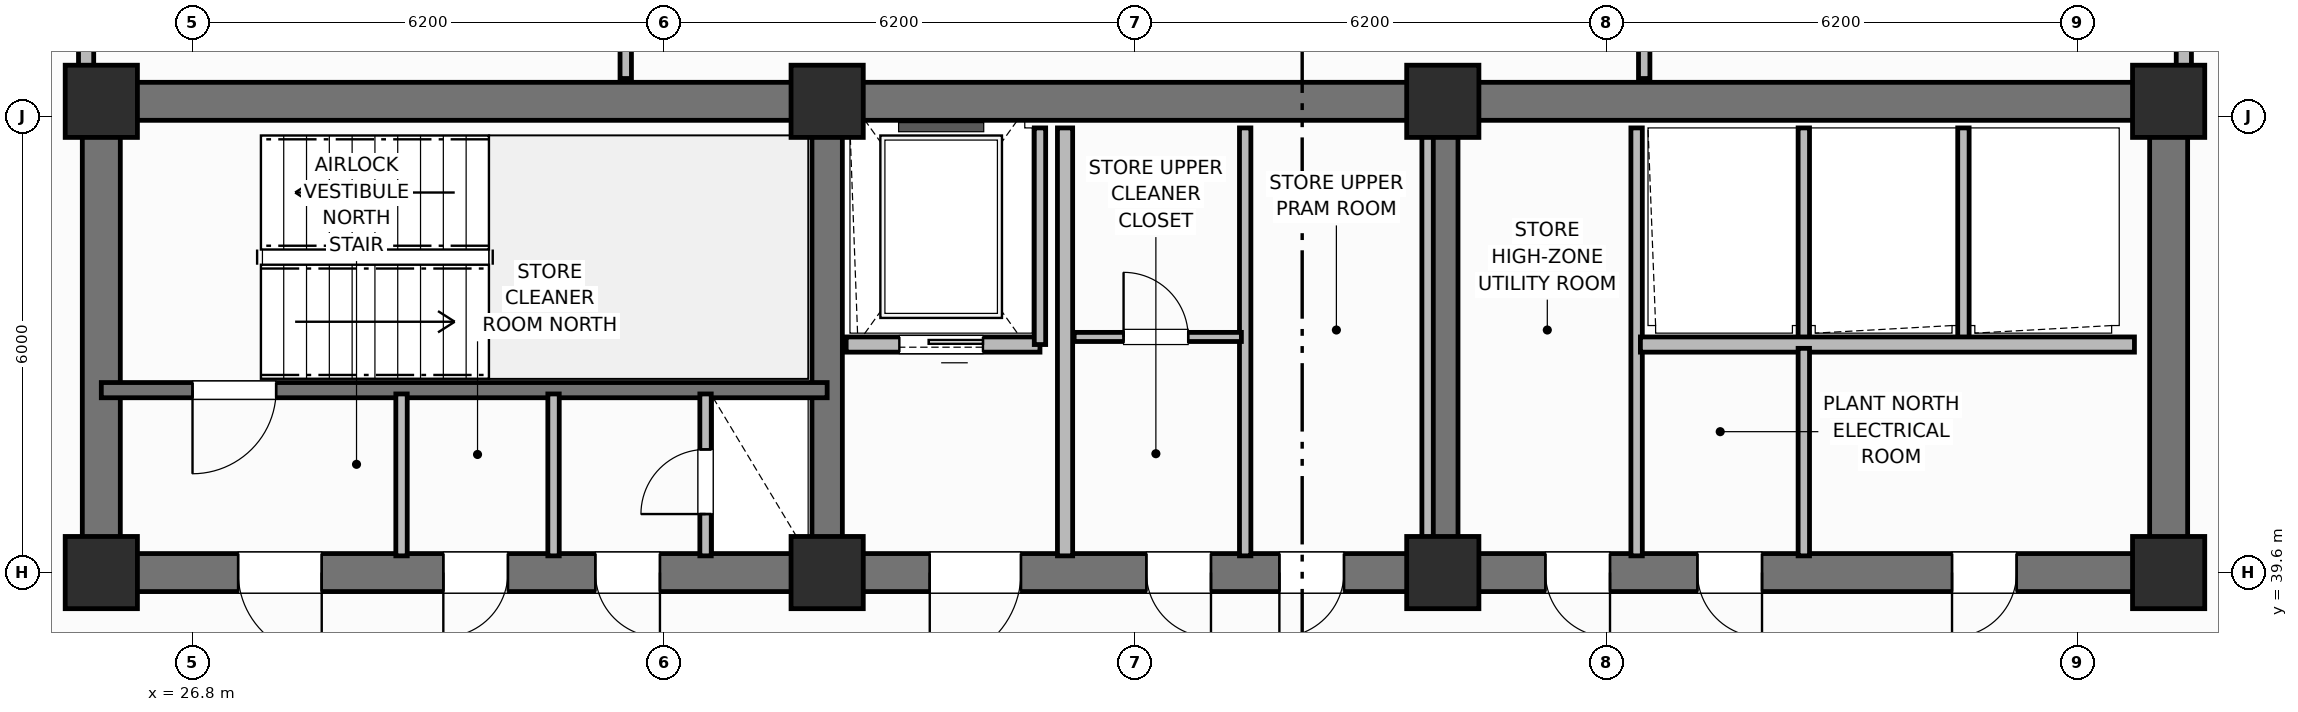
"""IFC4 building model, lengths in metres.
Left out: names, types, materials, properties, quantities, classifications, styles, units other than length and angle.
Written with IfcOpenShell. Run it as: python <this file> out.ifc"""

import sys

from ifc_helpers import new_model, si_unit, direction, frame, frame_2d, origin, origin_2d, place, context, subcontext, project, spatial, rectangle, extrude, element, fill, save


model = new_model("IFC4")
c1 = context("Model", 3, precision=1e-05, world=origin(), true_north=direction((0.0, 1.0)))
c2 = subcontext(c1, "Body", "Model", "MODEL_VIEW")
j1 = project(units=[si_unit("LENGTHUNIT", "METRE"), si_unit("PLANEANGLEUNIT", "RADIAN")], contexts=[c1])
p1 = place(None, origin())
s1 = spatial("IfcSite", under=j1, at=p1, CompositionType="ELEMENT")
p2 = place(p1, origin())
s2 = spatial("IfcBuilding", under=s1, at=p2, CompositionType="ELEMENT")
p3 = place(p2, frame((0.0, 0.0, 192.2)))
s3 = spatial("IfcBuildingStorey", under=s2, at=p3, CompositionType="ELEMENT", Elevation=192.2)
p4 = place(p3, frame((25.6, 45.8, 0.0), z_axis=(0.0, 0.0, 1.0), x_axis=(1.0, 0.0, 0.0)))
e1 = element("IfcWall", 1, at=p4, inside=s3, PredefinedType="SHEAR", context=c2, shape_type="SweptSolid", body=[
    extrude(rectangle(XDim=27.2, YDim=0.5, at=frame_2d((13.6, 0.0))), origin(), (0.0, 0.0, 1.0), 3.7),
])
for number, where, z_axis, x_axis in (
    (2, (25.6, 39.85, 0.0), (0.0, 0.0, 1.0), (0.0, 1.0, 0.0)),
    (3, (52.8, 39.85, 0.0), (0.0, 0.0, 1.0), (0.0, 1.0, 0.0)),
):
    element("IfcWall", number, at=place(p3, frame(where, z_axis=z_axis, x_axis=x_axis)), inside=s3, PredefinedType="SHEAR", context=c2, shape_type="SweptSolid", body=[
        extrude(rectangle(XDim=5.7, YDim=0.5, at=frame_2d((2.85, 0.0))), origin(), (0.0, 0.0, 1.0), 3.7),
    ])
p5 = place(p3, frame((52.8, 39.6, 0.0), z_axis=(0.0, 0.0, 1.0), x_axis=(-1.0, 0.0, 0.0)))
e4 = element("IfcWall", 4, at=p5, inside=s3, PredefinedType="SHEAR", context=c2, shape_type="SweptSolid", body=[
    extrude(rectangle(XDim=27.2, YDim=0.5, at=frame_2d((13.6, 0.0))), origin(), (0.0, 0.0, 1.0), 3.7),
])
p6 = place(p5, frame((24.3, 0.0, 0.0)))
e5 = element("IfcOpeningElement", 5, at=p6, cuts=e4, PredefinedType="OPENING", context=c2, shape_type="SweptSolid", body=[
    extrude(rectangle(XDim=1.1, YDim=2.15, at=frame_2d((0.55, 1.075))), frame((0.0, 0.26, 0.0), z_axis=(0.0, -1.0, 0.0), x_axis=(1.0, 0.0, 0.0)), (0.0, 0.0, 1.0), 0.52),
])
p7 = place(p5, frame((21.85, 0.0, 0.0)))
e6 = element("IfcOpeningElement", 6, at=p7, cuts=e4, PredefinedType="OPENING", context=c2, shape_type="SweptSolid", body=[
    extrude(rectangle(XDim=0.85, YDim=2.1, at=frame_2d((0.425, 1.05))), frame((0.0, 0.26, 0.0), z_axis=(0.0, -1.0, 0.0), x_axis=(1.0, 0.0, 0.0)), (0.0, 0.0, 1.0), 0.52),
])
p8 = place(p5, frame((19.85, 0.0, 0.0)))
e7 = element("IfcOpeningElement", 7, at=p8, cuts=e4, PredefinedType="OPENING", context=c2, shape_type="SweptSolid", body=[
    extrude(rectangle(XDim=0.85, YDim=2.1, at=frame_2d((0.425, 1.05))), frame((0.0, 0.26, 0.0), z_axis=(0.0, -1.0, 0.0), x_axis=(1.0, 0.0, 0.0)), (0.0, 0.0, 1.0), 0.52),
])
p9 = place(p5, frame((15.1, 0.0, 0.0)))
e8 = element("IfcOpeningElement", 8, at=p9, cuts=e4, PredefinedType="OPENING", context=c2, shape_type="SweptSolid", body=[
    extrude(rectangle(XDim=1.2, YDim=2.15, at=frame_2d((0.6, 1.075))), frame((0.0, 0.26, 0.0), z_axis=(0.0, -1.0, 0.0), x_axis=(1.0, 0.0, 0.0)), (0.0, 0.0, 1.0), 0.52),
])
p10 = place(p5, frame((12.6, 0.0, 0.0)))
e9 = element("IfcOpeningElement", 9, at=p10, cuts=e4, PredefinedType="OPENING", context=c2, shape_type="SweptSolid", body=[
    extrude(rectangle(XDim=0.85, YDim=2.1, at=frame_2d((0.425, 1.05))), frame((0.0, 0.26, 0.0), z_axis=(0.0, -1.0, 0.0), x_axis=(1.0, 0.0, 0.0)), (0.0, 0.0, 1.0), 0.52),
])
p11 = place(p5, frame((10.85, 0.0, 0.0)))
e10 = element("IfcOpeningElement", 10, at=p11, cuts=e4, PredefinedType="OPENING", context=c2, shape_type="SweptSolid", body=[
    extrude(rectangle(XDim=0.85, YDim=2.1, at=frame_2d((0.425, 1.05))), frame((0.0, 0.26, 0.0), z_axis=(0.0, -1.0, 0.0), x_axis=(1.0, 0.0, 0.0)), (0.0, 0.0, 1.0), 0.52),
])
p12 = place(p5, frame((7.35, 0.0, 0.0)))
e11 = element("IfcOpeningElement", 11, at=p12, cuts=e4, PredefinedType="OPENING", context=c2, shape_type="SweptSolid", body=[
    extrude(rectangle(XDim=0.85, YDim=2.1, at=frame_2d((0.425, 1.05))), frame((0.0, 0.26, 0.0), z_axis=(0.0, -1.0, 0.0), x_axis=(1.0, 0.0, 0.0)), (0.0, 0.0, 1.0), 0.52),
])
p13 = place(p5, frame((5.35, 0.0, 0.0)))
e12 = element("IfcOpeningElement", 12, at=p13, cuts=e4, PredefinedType="OPENING", context=c2, shape_type="SweptSolid", body=[
    extrude(rectangle(XDim=0.85, YDim=2.1, at=frame_2d((0.425, 1.05))), frame((0.0, 0.26, 0.0), z_axis=(0.0, -1.0, 0.0), x_axis=(1.0, 0.0, 0.0)), (0.0, 0.0, 1.0), 0.52),
])
p14 = place(p5, frame((2.0, 0.0, 0.0)))
e13 = element("IfcOpeningElement", 13, at=p14, cuts=e4, PredefinedType="OPENING", context=c2, shape_type="SweptSolid", body=[
    extrude(rectangle(XDim=0.85, YDim=2.1, at=frame_2d((0.425, 1.05))), frame((0.0, 0.26, 0.0), z_axis=(0.0, -1.0, 0.0), x_axis=(1.0, 0.0, 0.0)), (0.0, 0.0, 1.0), 0.52),
])
for number, where, z_axis, x_axis in (
    (14, (35.15, 39.85, 0.0), (0.0, 0.0, 1.0), (0.0, 1.0, 0.0)),
    (15, (43.25, 39.85, 0.0), (0.0, 0.0, 1.0), (0.0, 1.0, 0.0)),
):
    element("IfcWall", number, at=place(p3, frame(where, z_axis=z_axis, x_axis=x_axis)), inside=s3, PredefinedType="SHEAR", context=c2, shape_type="SweptSolid", body=[
        extrude(rectangle(XDim=5.7, YDim=0.4, at=frame_2d((2.85, 0.0))), origin(), (0.0, 0.0, 1.0), 3.7),
    ])
for number, where, z_axis, x_axis in (
    (16, (25.6, 39.6, 0.0), (0.0, 0.0, 1.0), (1.0, 0.0, 0.0)),
    (17, (25.6, 45.8, 0.0), (0.0, 0.0, 1.0), (1.0, 0.0, 0.0)),
    (18, (35.15, 39.6, 0.0), (0.0, 0.0, 1.0), (1.0, 0.0, 0.0)),
    (19, (35.15, 45.8, 0.0), (0.0, 0.0, 1.0), (1.0, 0.0, 0.0)),
    (20, (43.25, 39.6, 0.0), (0.0, 0.0, 1.0), (1.0, 0.0, 0.0)),
    (21, (43.25, 45.8, 0.0), (0.0, 0.0, 1.0), (1.0, 0.0, 0.0)),
    (22, (52.8, 39.6, 0.0), (0.0, 0.0, 1.0), (1.0, 0.0, 0.0)),
    (23, (52.8, 45.8, 0.0), (0.0, 0.0, 1.0), (1.0, 0.0, 0.0)),
):
    element("IfcColumn", number, at=place(p3, frame(where, z_axis=z_axis, x_axis=x_axis)), inside=s3, PredefinedType="COLUMN", context=c2, shape_type="SweptSolid", body=[
        extrude(rectangle(XDim=0.95, YDim=0.95, at=origin_2d()), origin(), (0.0, 0.0, 1.0), 3.7),
    ])
p15 = place(p3, frame((35.15, 42.0, 0.0), z_axis=(0.0, 0.0, 1.0), x_axis=(-1.0, 0.0, 0.0)))
e24 = element("IfcWall", 24, at=p15, inside=s3, PredefinedType="SHEAR", context=c2, shape_type="SweptSolid", body=[
    extrude(rectangle(XDim=9.55, YDim=0.2, at=frame_2d((4.775, 0.0))), origin(), (0.0, 0.0, 1.0), 3.7),
])
p16 = place(p15, frame((7.25, 0.0, 0.0)))
e25 = element("IfcOpeningElement", 25, at=p16, cuts=e24, PredefinedType="OPENING", context=c2, shape_type="SweptSolid", body=[
    extrude(rectangle(XDim=1.1, YDim=2.15, at=frame_2d((0.55, 1.075))), frame((0.0, 0.11, 0.0), z_axis=(0.0, -1.0, 0.0), x_axis=(1.0, 0.0, 0.0)), (0.0, 0.0, 1.0), 0.22),
])
p17 = place(p3, frame((33.55, 39.82, 0.0), z_axis=(0.0, 0.0, 1.0), x_axis=(0.0, 1.0, 0.0)))
e26 = element("IfcWall", 26, at=p17, inside=s3, PredefinedType="PARTITIONING", context=c2, shape_type="SweptSolid", body=[
    extrude(rectangle(XDim=2.13, YDim=0.15, at=frame_2d((1.065, 0.0))), origin(), (0.0, 0.0, 1.0), 2.49),
])
p18 = place(p17, frame((0.55, 0.0, 0.0)))
e27 = element("IfcOpeningElement", 27, at=p18, cuts=e26, PredefinedType="OPENING", context=c2, shape_type="SweptSolid", body=[
    extrude(rectangle(XDim=0.85, YDim=2.05, at=frame_2d((0.425, 1.025))), frame((0.0, 0.085, 0.0), z_axis=(0.0, -1.0, 0.0), x_axis=(1.0, 0.0, 0.0)), (0.0, 0.0, 1.0), 0.17),
])
for number, where, z_axis, x_axis in (
    (28, (29.55, 39.82, 0.0), (0.0, 0.0, 1.0), (0.0, 1.0, 0.0)),
    (29, (31.55, 39.82, 0.0), (0.0, 0.0, 1.0), (0.0, 1.0, 0.0)),
):
    element("IfcWall", number, at=place(p3, frame(where, z_axis=z_axis, x_axis=x_axis)), inside=s3, PredefinedType="PARTITIONING", context=c2, shape_type="SweptSolid", body=[
        extrude(rectangle(XDim=2.13, YDim=0.15, at=frame_2d((1.065, 0.0))), origin(), (0.0, 0.0, 1.0), 2.49),
    ])
p19 = place(p3, frame((37.95, 42.6, 0.0), z_axis=(0.0, 0.0, 1.0), x_axis=(-1.0, 0.0, 0.0)))
e30 = element("IfcWall", 30, at=p19, inside=s3, PredefinedType="PARTITIONING", context=c2, shape_type="SweptSolid", body=[
    extrude(rectangle(XDim=2.55, YDim=0.2, at=frame_2d((1.275, 0.0))), origin(), (0.0, 0.0, 1.0), 2.26),
])
p20 = place(p19, frame((0.75, 0.0, 0.0)))
e31 = element("IfcOpeningElement", 31, at=p20, cuts=e30, PredefinedType="OPENING", context=c2, shape_type="SweptSolid", body=[
    extrude(rectangle(XDim=1.1, YDim=2.15, at=frame_2d((0.55, 1.075))), frame((0.0, 0.11, 0.0), z_axis=(0.0, -1.0, 0.0), x_axis=(1.0, 0.0, 0.0)), (0.0, 0.0, 1.0), 0.22),
])
p21 = place(p3, frame((37.95, 42.6, 0.0), z_axis=(0.0, 0.0, 1.0), x_axis=(0.0, 1.0, 0.0)))
e32 = element("IfcWall", 32, at=p21, inside=s3, PredefinedType="PARTITIONING", context=c2, shape_type="SweptSolid", body=[
    extrude(rectangle(XDim=2.85, YDim=0.15, at=frame_2d((1.425, 0.0))), origin(), (0.0, 0.0, 1.0), 2.49),
])
p22 = place(p3, frame((38.28, 39.82, 0.0), z_axis=(0.0, 0.0, 1.0), x_axis=(0.0, 1.0, 0.0)))
e33 = element("IfcWall", 33, at=p22, inside=s3, PredefinedType="PARTITIONING", context=c2, shape_type="SweptSolid", body=[
    extrude(rectangle(XDim=5.63, YDim=0.2, at=frame_2d((2.815, 0.0))), origin(), (0.0, 0.0, 1.0), 2.49),
])
for number, where, z_axis, x_axis in (
    (34, (43.05, 39.82, 0.0), (0.0, 0.0, 1.0), (0.0, 1.0, 0.0)),
    (35, (40.65, 39.82, 0.0), (0.0, 0.0, 1.0), (0.0, 1.0, 0.0)),
):
    element("IfcWall", number, at=place(p3, frame(where, z_axis=z_axis, x_axis=x_axis)), inside=s3, PredefinedType="PARTITIONING", context=c2, shape_type="SweptSolid", body=[
        extrude(rectangle(XDim=5.63, YDim=0.15, at=frame_2d((2.815, 0.0))), origin(), (0.0, 0.0, 1.0), 2.49),
    ])
p23 = place(p3, frame((38.4, 42.7, 0.0), z_axis=(0.0, 0.0, 1.0), x_axis=(1.0, 0.0, 0.0)))
e36 = element("IfcWall", 36, at=p23, inside=s3, PredefinedType="PARTITIONING", context=c2, shape_type="SweptSolid", body=[
    extrude(rectangle(XDim=2.2, YDim=0.12, at=frame_2d((1.1, 0.0))), origin(), (0.0, 0.0, 1.0), 2.26),
])
p24 = place(p23, frame((0.65, 0.0, 0.0)))
e37 = element("IfcOpeningElement", 37, at=p24, cuts=e36, PredefinedType="OPENING", context=c2, shape_type="SweptSolid", body=[
    extrude(rectangle(XDim=0.85, YDim=2.1, at=frame_2d((0.425, 1.05))), frame((0.0, 0.07, 0.0), z_axis=(0.0, -1.0, 0.0), x_axis=(1.0, 0.0, 0.0)), (0.0, 0.0, 1.0), 0.14),
])
p25 = place(p3, frame((45.8, 39.82, 0.0), z_axis=(0.0, 0.0, 1.0), x_axis=(0.0, 1.0, 0.0)))
e38 = element("IfcWall", 38, at=p25, inside=s3, PredefinedType="PARTITIONING", context=c2, shape_type="SweptSolid", body=[
    extrude(rectangle(XDim=5.63, YDim=0.15, at=frame_2d((2.815, 0.0))), origin(), (0.0, 0.0, 1.0), 2.49),
])
for number, where, z_axis, x_axis in (
    (39, (48.0, 42.65, 0.0), (0.0, 0.0, 1.0), (0.0, 1.0, 0.0)),
    (40, (50.1, 42.65, 0.0), (0.0, 0.0, 1.0), (0.0, 1.0, 0.0)),
):
    element("IfcWall", number, at=place(p3, frame(where, z_axis=z_axis, x_axis=x_axis)), inside=s3, PredefinedType="PARTITIONING", context=c2, shape_type="SweptSolid", body=[
        extrude(rectangle(XDim=2.8, YDim=0.15, at=frame_2d((1.4, 0.0))), origin(), (0.0, 0.0, 1.0), 2.49),
    ])
p26 = place(p3, frame((52.35, 42.6, 0.0), z_axis=(0.0, 0.0, 1.0), x_axis=(-1.0, 0.0, 0.0)))
e41 = element("IfcWall", 41, at=p26, inside=s3, PredefinedType="PARTITIONING", context=c2, shape_type="SweptSolid", body=[
    extrude(rectangle(XDim=6.5, YDim=0.2, at=frame_2d((3.25, 0.0))), origin(), (0.0, 0.0, 1.0), 2.49),
])
p27 = place(p3, frame((48.0, 39.82, 0.0), z_axis=(0.0, 0.0, 1.0), x_axis=(0.0, 1.0, 0.0)))
e42 = element("IfcWall", 42, at=p27, inside=s3, PredefinedType="PARTITIONING", context=c2, shape_type="SweptSolid", body=[
    extrude(rectangle(XDim=2.73, YDim=0.15, at=frame_2d((1.365, 0.0))), origin(), (0.0, 0.0, 1.0), 2.49),
])
p28 = place(p3, frame((32.5, 46.1, 0.0), z_axis=(0.0, 0.0, 1.0), x_axis=(0.0, 1.0, 0.0)))
e43 = element("IfcWall", 43, at=p28, inside=s3, PredefinedType="PARTITIONING", context=c2, shape_type="SweptSolid", body=[
    extrude(rectangle(XDim=3.43, YDim=0.15, at=frame_2d((1.715, 0.0))), origin(), (0.0, 0.0, 1.0), 2.49),
])
p29 = place(p28, frame((0.85, 0.0, 0.0)))
e44 = element("IfcOpeningElement", 44, at=p29, cuts=e43, PredefinedType="OPENING", context=c2, shape_type="SweptSolid", body=[
    extrude(rectangle(XDim=0.9, YDim=2.1, at=frame_2d((0.45, 1.05))), frame((0.0, 0.085, 0.0), z_axis=(0.0, -1.0, 0.0), x_axis=(1.0, 0.0, 0.0)), (0.0, 0.0, 1.0), 0.17),
])
p30 = place(p3, frame((45.9, 46.1, 0.0), z_axis=(0.0, 0.0, 1.0), x_axis=(0.0, 1.0, 0.0)))
e45 = element("IfcWall", 45, at=p30, inside=s3, PredefinedType="PARTITIONING", context=c2, shape_type="SweptSolid", body=[
    extrude(rectangle(XDim=3.43, YDim=0.15, at=frame_2d((1.715, 0.0))), origin(), (0.0, 0.0, 1.0), 2.49),
])
p31 = place(p3, frame((25.4, 46.1, 0.0), z_axis=(0.0, 0.0, 1.0), x_axis=(0.0, 1.0, 0.0)))
e46 = element("IfcWall", 46, at=p31, inside=s3, PredefinedType="PARTITIONING", context=c2, shape_type="SweptSolid", body=[
    extrude(rectangle(XDim=2.33, YDim=0.2, at=frame_2d((1.165, 0.0))), origin(), (0.0, 0.0, 1.0), 2.49),
])
p32 = place(p31, frame((0.65, 0.0, 0.0)))
e47 = element("IfcOpeningElement", 47, at=p32, cuts=e46, PredefinedType="OPENING", context=c2, shape_type="SweptSolid", body=[
    extrude(rectangle(XDim=0.9, YDim=2.1, at=frame_2d((0.45, 1.05))), frame((0.0, 0.11, 0.0), z_axis=(0.0, -1.0, 0.0), x_axis=(1.0, 0.0, 0.0)), (0.0, 0.0, 1.0), 0.22),
])
p33 = place(p3, frame((53.0, 46.1, 0.0), z_axis=(0.0, 0.0, 1.0), x_axis=(0.0, 1.0, 0.0)))
e48 = element("IfcWall", 48, at=p33, inside=s3, PredefinedType="PARTITIONING", context=c2, shape_type="SweptSolid", body=[
    extrude(rectangle(XDim=2.33, YDim=0.2, at=frame_2d((1.165, 0.0))), origin(), (0.0, 0.0, 1.0), 2.49),
])
p34 = place(p33, frame((0.65, 0.0, 0.0)))
e49 = element("IfcOpeningElement", 49, at=p34, cuts=e48, PredefinedType="OPENING", context=c2, shape_type="SweptSolid", body=[
    extrude(rectangle(XDim=0.9, YDim=2.1, at=frame_2d((0.45, 1.05))), frame((0.0, 0.11, 0.0), z_axis=(0.0, -1.0, 0.0), x_axis=(1.0, 0.0, 0.0)), (0.0, 0.0, 1.0), 0.22),
])
p35 = place(p16, origin())
e50 = element("IfcDoor", 50, at=p35, inside=s3, OperationType="SINGLE_SWING_RIGHT", PredefinedType="DOOR", context=c2, shape_type="SweptSolid", body=[
    extrude(rectangle(XDim=1.1, YDim=2.15, at=frame_2d((0.55, 1.075))), frame((0.0, 0.025, 0.0), z_axis=(0.0, -1.0, 0.0), x_axis=(1.0, 0.0, 0.0)), (0.0, 0.0, 1.0), 0.05),
])
fill(e25, e50)
p36 = place(p18, origin())
e51 = element("IfcDoor", 51, at=p36, inside=s3, OperationType="SINGLE_SWING_LEFT", PredefinedType="TRAPDOOR", context=c2, shape_type="SweptSolid", body=[
    extrude(rectangle(XDim=0.85, YDim=2.05, at=frame_2d((0.425, 1.025))), frame((0.0, 0.025, 0.0), z_axis=(0.0, -1.0, 0.0), x_axis=(1.0, 0.0, 0.0)), (0.0, 0.0, 1.0), 0.05),
])
fill(e27, e51)
p37 = place(p20, origin())
e52 = element("IfcDoor", 52, at=p37, inside=s3, OperationType="SLIDING_TO_LEFT", PredefinedType="DOOR", context=c2, shape_type="SweptSolid", body=[
    extrude(rectangle(XDim=1.1, YDim=2.15, at=frame_2d((0.55, 1.075))), frame((0.0, 0.025, 0.0), z_axis=(0.0, -1.0, 0.0), x_axis=(1.0, 0.0, 0.0)), (0.0, 0.0, 1.0), 0.05),
])
fill(e31, e52)
p38 = place(p24, origin())
e53 = element("IfcDoor", 53, at=p38, inside=s3, OperationType="SINGLE_SWING_LEFT", PredefinedType="DOOR", context=c2, shape_type="SweptSolid", body=[
    extrude(rectangle(XDim=0.85, YDim=2.1, at=frame_2d((0.425, 1.05))), frame((0.0, 0.025, 0.0), z_axis=(0.0, -1.0, 0.0), x_axis=(1.0, 0.0, 0.0)), (0.0, 0.0, 1.0), 0.05),
])
fill(e37, e53)
p39 = place(p6, origin())
e54 = element("IfcDoor", 54, at=p39, inside=s3, OperationType="SINGLE_SWING_LEFT", PredefinedType="DOOR", context=c2, shape_type="SweptSolid", body=[
    extrude(rectangle(XDim=1.1, YDim=2.15, at=frame_2d((0.55, 1.075))), frame((0.0, 0.025, 0.0), z_axis=(0.0, -1.0, 0.0), x_axis=(1.0, 0.0, 0.0)), (0.0, 0.0, 1.0), 0.05),
])
fill(e5, e54)
p40 = place(p7, origin())
e55 = element("IfcDoor", 55, at=p40, inside=s3, OperationType="SINGLE_SWING_RIGHT", PredefinedType="DOOR", context=c2, shape_type="SweptSolid", body=[
    extrude(rectangle(XDim=0.85, YDim=2.1, at=frame_2d((0.425, 1.05))), frame((0.0, 0.025, 0.0), z_axis=(0.0, -1.0, 0.0), x_axis=(1.0, 0.0, 0.0)), (0.0, 0.0, 1.0), 0.05),
])
fill(e6, e55)
p41 = place(p8, origin())
e56 = element("IfcDoor", 56, at=p41, inside=s3, OperationType="SINGLE_SWING_LEFT", PredefinedType="DOOR", context=c2, shape_type="SweptSolid", body=[
    extrude(rectangle(XDim=0.85, YDim=2.1, at=frame_2d((0.425, 1.05))), frame((0.0, 0.025, 0.0), z_axis=(0.0, -1.0, 0.0), x_axis=(1.0, 0.0, 0.0)), (0.0, 0.0, 1.0), 0.05),
])
fill(e7, e56)
p42 = place(p9, origin())
e57 = element("IfcDoor", 57, at=p42, inside=s3, OperationType="SINGLE_SWING_RIGHT", PredefinedType="DOOR", context=c2, shape_type="SweptSolid", body=[
    extrude(rectangle(XDim=1.2, YDim=2.15, at=frame_2d((0.6, 1.075))), frame((0.0, 0.025, 0.0), z_axis=(0.0, -1.0, 0.0), x_axis=(1.0, 0.0, 0.0)), (0.0, 0.0, 1.0), 0.05),
])
fill(e8, e57)
p43 = place(p10, origin())
e58 = element("IfcDoor", 58, at=p43, inside=s3, OperationType="SINGLE_SWING_LEFT", PredefinedType="DOOR", context=c2, shape_type="SweptSolid", body=[
    extrude(rectangle(XDim=0.85, YDim=2.1, at=frame_2d((0.425, 1.05))), frame((0.0, 0.025, 0.0), z_axis=(0.0, -1.0, 0.0), x_axis=(1.0, 0.0, 0.0)), (0.0, 0.0, 1.0), 0.05),
])
fill(e9, e58)
p44 = place(p11, origin())
e59 = element("IfcDoor", 59, at=p44, inside=s3, OperationType="SINGLE_SWING_RIGHT", PredefinedType="DOOR", context=c2, shape_type="SweptSolid", body=[
    extrude(rectangle(XDim=0.85, YDim=2.1, at=frame_2d((0.425, 1.05))), frame((0.0, 0.025, 0.0), z_axis=(0.0, -1.0, 0.0), x_axis=(1.0, 0.0, 0.0)), (0.0, 0.0, 1.0), 0.05),
])
fill(e10, e59)
p45 = place(p12, origin())
e60 = element("IfcDoor", 60, at=p45, inside=s3, OperationType="SINGLE_SWING_LEFT", PredefinedType="DOOR", context=c2, shape_type="SweptSolid", body=[
    extrude(rectangle(XDim=0.85, YDim=2.1, at=frame_2d((0.425, 1.05))), frame((0.0, 0.025, 0.0), z_axis=(0.0, -1.0, 0.0), x_axis=(1.0, 0.0, 0.0)), (0.0, 0.0, 1.0), 0.05),
])
fill(e11, e60)
p46 = place(p13, origin())
e61 = element("IfcDoor", 61, at=p46, inside=s3, OperationType="SINGLE_SWING_LEFT", PredefinedType="DOOR", context=c2, shape_type="SweptSolid", body=[
    extrude(rectangle(XDim=0.85, YDim=2.1, at=frame_2d((0.425, 1.05))), frame((0.0, 0.025, 0.0), z_axis=(0.0, -1.0, 0.0), x_axis=(1.0, 0.0, 0.0)), (0.0, 0.0, 1.0), 0.05),
])
fill(e12, e61)
p47 = place(p14, origin())
e62 = element("IfcDoor", 62, at=p47, inside=s3, OperationType="SINGLE_SWING_RIGHT", PredefinedType="DOOR", context=c2, shape_type="SweptSolid", body=[
    extrude(rectangle(XDim=0.85, YDim=2.1, at=frame_2d((0.425, 1.05))), frame((0.0, 0.025, 0.0), z_axis=(0.0, -1.0, 0.0), x_axis=(1.0, 0.0, 0.0)), (0.0, 0.0, 1.0), 0.05),
])
fill(e13, e62)
save(model, sys.argv[1])
